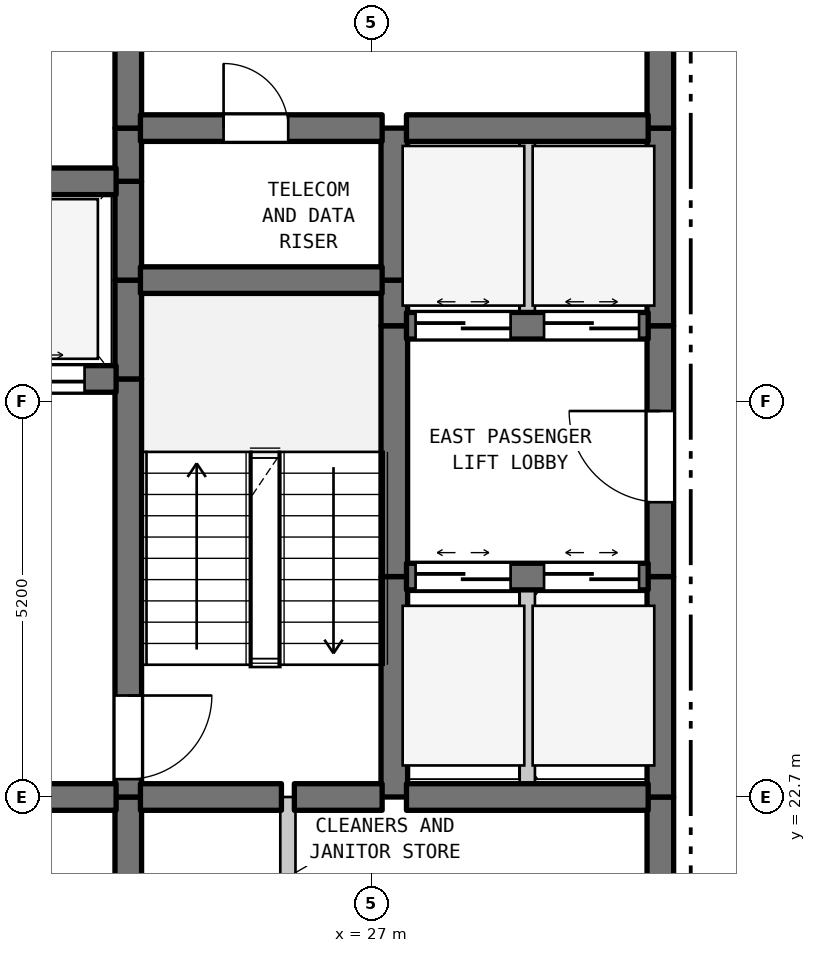
"""IFC4 building model, lengths in metres.
Left out: names, types, materials, properties, quantities, classifications, styles, units other than length and angle.
Written with IfcOpenShell. Run it as: python <this file> out.ifc"""

import sys

from ifc_helpers import new_model, si_unit, direction, frame, frame_2d, origin, place, context, subcontext, project, spatial, rectangle, extrude, element, fill, save


model = new_model("IFC4")
c1 = context("Model", 3, precision=1e-05, world=origin(), true_north=direction((0.0, 1.0)))
c2 = subcontext(c1, "Body", "Model", "MODEL_VIEW")
j1 = project(units=[si_unit("LENGTHUNIT", "METRE"), si_unit("PLANEANGLEUNIT", "RADIAN")], contexts=[c1])
p1 = place(None, origin())
s1 = spatial("IfcSite", under=j1, at=p1, CompositionType="ELEMENT")
p2 = place(p1, origin())
s2 = spatial("IfcBuilding", under=s1, at=p2, CompositionType="ELEMENT")
p3 = place(p2, frame((0.0, 0.0, 70.1)))
s3 = spatial("IfcBuildingStorey", under=s2, at=p3, CompositionType="ELEMENT", Elevation=70.1)
p4 = place(p3, frame((23.8, 19.5, 0.0), z_axis=(0.0, 0.0, 1.0), x_axis=(0.0, 1.0, 0.0)))
e1 = element("IfcWall", 1, at=p4, inside=s3, PredefinedType="SHEAR", context=c2, shape_type="SweptSolid", body=[
    extrude(rectangle(XDim=3.2, YDim=0.35, at=frame_2d((1.6, 0.0))), origin(), (0.0, 0.0, 1.0), 3.385),
])
p5 = place(p3, frame((23.8, 22.7, 0.0), z_axis=(0.0, 0.0, 1.0), x_axis=(0.0, 1.0, 0.0)))
e2 = element("IfcWall", 2, at=p5, inside=s3, PredefinedType="SHEAR", context=c2, shape_type="SweptSolid", body=[
    extrude(rectangle(XDim=5.5, YDim=0.35, at=frame_2d((2.75, 0.0))), origin(), (0.0, 0.0, 1.0), 3.385),
])
p6 = place(p5, frame((0.235, 0.0, 0.0)))
e3 = element("IfcOpeningElement", 3, at=p6, cuts=e2, PredefinedType="OPENING", context=c2, shape_type="SweptSolid", body=[
    extrude(rectangle(XDim=1.1, YDim=2.15, at=frame_2d((0.55, 1.075))), frame((0.0, 0.185, 0.0), z_axis=(0.0, -1.0, 0.0), x_axis=(1.0, 0.0, 0.0)), (0.0, 0.0, 1.0), 0.37),
])
for number, where, z_axis, x_axis in (
    (4, (23.8, 28.2, 0.0), (0.0, 0.0, 1.0), (0.0, 1.0, 0.0)),
    (5, (23.8, 29.5, 0.0), (0.0, 0.0, 1.0), (0.0, 1.0, 0.0)),
):
    element("IfcWall", number, at=place(p3, frame(where, z_axis=z_axis, x_axis=x_axis)), inside=s3, PredefinedType="SHEAR", context=c2, shape_type="SweptSolid", body=[
        extrude(rectangle(XDim=1.3, YDim=0.35, at=frame_2d((0.65, 0.0))), origin(), (0.0, 0.0, 1.0), 3.385),
    ])
p7 = place(p3, frame((23.8, 30.8, 0.0), z_axis=(0.0, 0.0, 1.0), x_axis=(0.0, 1.0, 0.0)))
e6 = element("IfcWall", 6, at=p7, inside=s3, PredefinedType="SHEAR", context=c2, shape_type="SweptSolid", body=[
    extrude(rectangle(XDim=0.7, YDim=0.35, at=frame_2d((0.35, 0.0))), origin(), (0.0, 0.0, 1.0), 3.385),
])
p8 = place(p3, frame((23.8, 31.5, 0.0), z_axis=(0.0, 0.0, 1.0), x_axis=(0.0, 1.0, 0.0)))
e7 = element("IfcWall", 7, at=p8, inside=s3, PredefinedType="SHEAR", context=c2, shape_type="SweptSolid", body=[
    extrude(rectangle(XDim=3.5, YDim=0.35, at=frame_2d((1.75, 0.0))), origin(), (0.0, 0.0, 1.0), 3.385),
])
p9 = place(p8, frame((1.127, 0.0, 0.0)))
e8 = element("IfcOpeningElement", 8, at=p9, cuts=e7, PredefinedType="OPENING", context=c2, shape_type="SweptSolid", body=[
    extrude(rectangle(XDim=1.1, YDim=2.15, at=frame_2d((0.55, 1.075))), frame((0.0, 0.185, 0.0), z_axis=(0.0, -1.0, 0.0), x_axis=(1.0, 0.0, 0.0)), (0.0, 0.0, 1.0), 0.37),
])
p10 = place(p3, frame((25.9, 19.5, 0.0), z_axis=(0.0, 0.0, 1.0), x_axis=(0.0, 1.0, 0.0)))
e9 = element("IfcWall", 9, at=p10, inside=s3, PredefinedType="STANDARD", context=c2, shape_type="SweptSolid", body=[
    extrude(rectangle(XDim=3.2, YDim=0.2, at=frame_2d((1.6, 0.0))), origin(), (0.0, 0.0, 1.0), 3.385),
])
p11 = place(p3, frame((27.3, 22.7, 0.0), z_axis=(0.0, 0.0, 1.0), x_axis=(0.0, 1.0, 0.0)))
e10 = element("IfcWall", 10, at=p11, inside=s3, PredefinedType="SHEAR", context=c2, shape_type="SweptSolid", body=[
    extrude(rectangle(XDim=2.9, YDim=0.35, at=frame_2d((1.45, 0.0))), origin(), (0.0, 0.0, 1.0), 3.385),
])
p12 = place(p3, frame((27.3, 25.6, 0.0), z_axis=(0.0, 0.0, 1.0), x_axis=(0.0, 1.0, 0.0)))
e11 = element("IfcWall", 11, at=p12, inside=s3, PredefinedType="SHEAR", context=c2, shape_type="SweptSolid", body=[
    extrude(rectangle(XDim=3.3, YDim=0.35, at=frame_2d((1.65, 0.0))), origin(), (0.0, 0.0, 1.0), 3.385),
])
p13 = place(p3, frame((27.3, 28.9, 0.0), z_axis=(0.0, 0.0, 1.0), x_axis=(0.0, 1.0, 0.0)))
e12 = element("IfcWall", 12, at=p13, inside=s3, PredefinedType="SHEAR", context=c2, shape_type="SweptSolid", body=[
    extrude(rectangle(XDim=0.6, YDim=0.35, at=frame_2d((0.3, 0.0))), origin(), (0.0, 0.0, 1.0), 3.385),
])
p14 = place(p3, frame((27.3, 29.5, 0.0), z_axis=(0.0, 0.0, 1.0), x_axis=(0.0, 1.0, 0.0)))
e13 = element("IfcWall", 13, at=p14, inside=s3, PredefinedType="SHEAR", context=c2, shape_type="SweptSolid", body=[
    extrude(rectangle(XDim=2.0, YDim=0.35, at=frame_2d((1.0, 0.0))), origin(), (0.0, 0.0, 1.0), 3.385),
])
p15 = place(p3, frame((29.05, 22.7, 0.0), z_axis=(0.0, 0.0, 1.0), x_axis=(0.0, 1.0, 0.0)))
e14 = element("IfcWall", 14, at=p15, inside=s3, PredefinedType="STANDARD", context=c2, shape_type="SweptSolid", body=[
    extrude(rectangle(XDim=2.9, YDim=0.2, at=frame_2d((1.45, 0.0))), origin(), (0.0, 0.0, 1.0), 3.385),
])
p16 = place(p3, frame((29.05, 28.9, 0.0), z_axis=(0.0, 0.0, 1.0), x_axis=(0.0, 1.0, 0.0)))
e15 = element("IfcWall", 15, at=p16, inside=s3, PredefinedType="STANDARD", context=c2, shape_type="SweptSolid", body=[
    extrude(rectangle(XDim=2.6, YDim=0.2, at=frame_2d((1.3, 0.0))), origin(), (0.0, 0.0, 1.0), 3.385),
])
p17 = place(p3, frame((30.8, 19.5, 0.0), z_axis=(0.0, 0.0, 1.0), x_axis=(0.0, 1.0, 0.0)))
e16 = element("IfcWall", 16, at=p17, inside=s3, PredefinedType="SHEAR", context=c2, shape_type="SweptSolid", body=[
    extrude(rectangle(XDim=3.2, YDim=0.35, at=frame_2d((1.6, 0.0))), origin(), (0.0, 0.0, 1.0), 3.385),
])
p18 = place(p3, frame((30.8, 22.7, 0.0), z_axis=(0.0, 0.0, 1.0), x_axis=(0.0, 1.0, 0.0)))
e17 = element("IfcWall", 17, at=p18, inside=s3, PredefinedType="SHEAR", context=c2, shape_type="SweptSolid", body=[
    extrude(rectangle(XDim=2.9, YDim=0.35, at=frame_2d((1.45, 0.0))), origin(), (0.0, 0.0, 1.0), 3.385),
])
p19 = place(p3, frame((30.8, 25.6, 0.0), z_axis=(0.0, 0.0, 1.0), x_axis=(0.0, 1.0, 0.0)))
e18 = element("IfcWall", 18, at=p19, inside=s3, PredefinedType="SHEAR", context=c2, shape_type="SweptSolid", body=[
    extrude(rectangle(XDim=3.3, YDim=0.35, at=frame_2d((1.65, 0.0))), origin(), (0.0, 0.0, 1.0), 3.385),
])
p20 = place(p19, frame((0.978, 0.0, 0.0)))
e19 = element("IfcOpeningElement", 19, at=p20, cuts=e18, PredefinedType="OPENING", context=c2, shape_type="SweptSolid", body=[
    extrude(rectangle(XDim=1.2, YDim=2.2, at=frame_2d((0.6, 1.1))), frame((0.0, 0.185, 0.0), z_axis=(0.0, -1.0, 0.0), x_axis=(1.0, 0.0, 0.0)), (0.0, 0.0, 1.0), 0.37),
])
p21 = place(p3, frame((30.8, 28.9, 0.0), z_axis=(0.0, 0.0, 1.0), x_axis=(0.0, 1.0, 0.0)))
e20 = element("IfcWall", 20, at=p21, inside=s3, PredefinedType="SHEAR", context=c2, shape_type="SweptSolid", body=[
    extrude(rectangle(XDim=2.6, YDim=0.35, at=frame_2d((1.3, 0.0))), origin(), (0.0, 0.0, 1.0), 3.385),
])
p22 = place(p3, frame((30.8, 31.5, 0.0), z_axis=(0.0, 0.0, 1.0), x_axis=(0.0, 1.0, 0.0)))
e21 = element("IfcWall", 21, at=p22, inside=s3, PredefinedType="SHEAR", context=c2, shape_type="SweptSolid", body=[
    extrude(rectangle(XDim=3.5, YDim=0.35, at=frame_2d((1.75, 0.0))), origin(), (0.0, 0.0, 1.0), 3.385),
])
p23 = place(p22, frame((1.15, 0.0, 0.0)))
e22 = element("IfcOpeningElement", 22, at=p23, cuts=e21, PredefinedType="OPENING", context=c2, shape_type="SweptSolid", body=[
    extrude(rectangle(XDim=1.2, YDim=2.2, at=frame_2d((0.6, 1.1))), frame((0.0, 0.185, 0.0), z_axis=(0.0, -1.0, 0.0), x_axis=(1.0, 0.0, 0.0)), (0.0, 0.0, 1.0), 0.37),
])
p24 = place(p3, frame((19.16, 22.7, 0.0), z_axis=(0.0, 0.0, 1.0), x_axis=(1.0, 0.0, 0.0)))
e23 = element("IfcWall", 23, at=p24, inside=s3, PredefinedType="SHEAR", context=c2, shape_type="SweptSolid", body=[
    extrude(rectangle(XDim=4.48, YDim=0.35, at=frame_2d((2.24, 0.0))), origin(), (0.0, 0.0, 1.0), 3.385),
])
p25 = place(p24, frame((1.64, 0.0, 0.0)))
e24 = element("IfcOpeningElement", 24, at=p25, cuts=e23, PredefinedType="OPENING", context=c2, shape_type="SweptSolid", body=[
    extrude(rectangle(XDim=1.2, YDim=2.2, at=frame_2d((0.6, 1.1))), frame((0.0, 0.185, 0.0), z_axis=(0.0, -1.0, 0.0), x_axis=(1.0, 0.0, 0.0)), (0.0, 0.0, 1.0), 0.37),
])
p26 = place(p3, frame((23.96, 22.7, 0.0), z_axis=(0.0, 0.0, 1.0), x_axis=(1.0, 0.0, 0.0)))
e25 = element("IfcWall", 25, at=p26, inside=s3, PredefinedType="SHEAR", context=c2, shape_type="SweptSolid", body=[
    extrude(rectangle(XDim=1.855, YDim=0.35, at=frame_2d((0.927, 0.0))), origin(), (0.0, 0.0, 1.0), 3.385),
])
p27 = place(p3, frame((25.985, 22.7, 0.0), z_axis=(0.0, 0.0, 1.0), x_axis=(1.0, 0.0, 0.0)))
e26 = element("IfcWall", 26, at=p27, inside=s3, PredefinedType="SHEAR", context=c2, shape_type="SweptSolid", body=[
    extrude(rectangle(XDim=1.155, YDim=0.35, at=frame_2d((0.577, 0.0))), origin(), (0.0, 0.0, 1.0), 3.385),
])
p28 = place(p3, frame((27.46, 22.7, 0.0), z_axis=(0.0, 0.0, 1.0), x_axis=(1.0, 0.0, 0.0)))
e27 = element("IfcWall", 27, at=p28, inside=s3, PredefinedType="SHEAR", context=c2, shape_type="SweptSolid", body=[
    extrude(rectangle(XDim=3.18, YDim=0.35, at=frame_2d((1.59, 0.0))), origin(), (0.0, 0.0, 1.0), 3.385),
])
p29 = place(p3, frame((27.46, 25.6, 0.0), z_axis=(0.0, 0.0, 1.0), x_axis=(1.0, 0.0, 0.0)))
e28 = element("IfcWall", 28, at=p29, inside=s3, PredefinedType="SHEAR", context=c2, shape_type="SweptSolid", body=[
    extrude(rectangle(XDim=3.18, YDim=0.35, at=frame_2d((1.59, 0.0))), origin(), (0.0, 0.0, 1.0), 3.385),
])
p30 = place(p29, frame((0.12, 0.0, 0.0)))
e29 = element("IfcOpeningElement", 29, at=p30, cuts=e28, PredefinedType="OPENING", context=c2, shape_type="SweptSolid", body=[
    extrude(rectangle(XDim=1.25, YDim=2.2, at=frame_2d((0.625, 1.1))), frame((0.0, 0.185, 0.0), z_axis=(0.0, -1.0, 0.0), x_axis=(1.0, 0.0, 0.0)), (0.0, 0.0, 1.0), 0.37),
])
p31 = place(p29, frame((1.81, 0.0, 0.0)))
e30 = element("IfcOpeningElement", 30, at=p31, cuts=e28, PredefinedType="OPENING", context=c2, shape_type="SweptSolid", body=[
    extrude(rectangle(XDim=1.25, YDim=2.2, at=frame_2d((0.625, 1.1))), frame((0.0, 0.185, 0.0), z_axis=(0.0, -1.0, 0.0), x_axis=(1.0, 0.0, 0.0)), (0.0, 0.0, 1.0), 0.37),
])
p32 = place(p3, frame((19.16, 28.2, 0.0), z_axis=(0.0, 0.0, 1.0), x_axis=(1.0, 0.0, 0.0)))
e31 = element("IfcWall", 31, at=p32, inside=s3, PredefinedType="SHEAR", context=c2, shape_type="SweptSolid", body=[
    extrude(rectangle(XDim=4.48, YDim=0.35, at=frame_2d((2.24, 0.0))), origin(), (0.0, 0.0, 1.0), 3.385),
])
p33 = place(p32, frame((0.415, 0.0, 0.0)))
e32 = element("IfcOpeningElement", 32, at=p33, cuts=e31, PredefinedType="OPENING", context=c2, shape_type="SweptSolid", body=[
    extrude(rectangle(XDim=1.25, YDim=2.2, at=frame_2d((0.625, 1.1))), frame((0.0, 0.185, 0.0), z_axis=(0.0, -1.0, 0.0), x_axis=(1.0, 0.0, 0.0)), (0.0, 0.0, 1.0), 0.37),
])
p34 = place(p32, frame((2.815, 0.0, 0.0)))
e33 = element("IfcOpeningElement", 33, at=p34, cuts=e31, PredefinedType="OPENING", context=c2, shape_type="SweptSolid", body=[
    extrude(rectangle(XDim=1.25, YDim=2.2, at=frame_2d((0.625, 1.1))), frame((0.0, 0.185, 0.0), z_axis=(0.0, -1.0, 0.0), x_axis=(1.0, 0.0, 0.0)), (0.0, 0.0, 1.0), 0.37),
])
p35 = place(p3, frame((27.46, 28.9, 0.0), z_axis=(0.0, 0.0, 1.0), x_axis=(1.0, 0.0, 0.0)))
e34 = element("IfcWall", 34, at=p35, inside=s3, PredefinedType="SHEAR", context=c2, shape_type="SweptSolid", body=[
    extrude(rectangle(XDim=3.18, YDim=0.35, at=frame_2d((1.59, 0.0))), origin(), (0.0, 0.0, 1.0), 3.385),
])
p36 = place(p35, frame((0.12, 0.0, 0.0)))
e35 = element("IfcOpeningElement", 35, at=p36, cuts=e34, PredefinedType="OPENING", context=c2, shape_type="SweptSolid", body=[
    extrude(rectangle(XDim=1.25, YDim=2.2, at=frame_2d((0.625, 1.1))), frame((0.0, 0.185, 0.0), z_axis=(0.0, -1.0, 0.0), x_axis=(1.0, 0.0, 0.0)), (0.0, 0.0, 1.0), 0.37),
])
p37 = place(p35, frame((1.81, 0.0, 0.0)))
e36 = element("IfcOpeningElement", 36, at=p37, cuts=e34, PredefinedType="OPENING", context=c2, shape_type="SweptSolid", body=[
    extrude(rectangle(XDim=1.25, YDim=2.2, at=frame_2d((0.625, 1.1))), frame((0.0, 0.185, 0.0), z_axis=(0.0, -1.0, 0.0), x_axis=(1.0, 0.0, 0.0)), (0.0, 0.0, 1.0), 0.37),
])
p38 = place(p3, frame((23.96, 29.5, 0.0), z_axis=(0.0, 0.0, 1.0), x_axis=(1.0, 0.0, 0.0)))
e37 = element("IfcWall", 37, at=p38, inside=s3, PredefinedType="SHEAR", context=c2, shape_type="SweptSolid", body=[
    extrude(rectangle(XDim=3.18, YDim=0.35, at=frame_2d((1.59, 0.0))), origin(), (0.0, 0.0, 1.0), 3.385),
])
p39 = place(p3, frame((19.16, 30.8, 0.0), z_axis=(0.0, 0.0, 1.0), x_axis=(1.0, 0.0, 0.0)))
e38 = element("IfcWall", 38, at=p39, inside=s3, PredefinedType="SHEAR", context=c2, shape_type="SweptSolid", body=[
    extrude(rectangle(XDim=4.48, YDim=0.35, at=frame_2d((2.24, 0.0))), origin(), (0.0, 0.0, 1.0), 3.385),
])
p40 = place(p3, frame((23.96, 31.5, 0.0), z_axis=(0.0, 0.0, 1.0), x_axis=(1.0, 0.0, 0.0)))
e39 = element("IfcWall", 39, at=p40, inside=s3, PredefinedType="SHEAR", context=c2, shape_type="SweptSolid", body=[
    extrude(rectangle(XDim=3.18, YDim=0.35, at=frame_2d((1.59, 0.0))), origin(), (0.0, 0.0, 1.0), 3.385),
])
p41 = place(p40, frame((1.094, 0.0, 0.0)))
e40 = element("IfcOpeningElement", 40, at=p41, cuts=e39, PredefinedType="OPENING", context=c2, shape_type="SweptSolid", body=[
    extrude(rectangle(XDim=0.85, YDim=2.1, at=frame_2d((0.425, 1.05))), frame((0.0, 0.185, 0.0), z_axis=(0.0, -1.0, 0.0), x_axis=(1.0, 0.0, 0.0)), (0.0, 0.0, 1.0), 0.37),
])
p42 = place(p3, frame((27.46, 31.5, 0.0), z_axis=(0.0, 0.0, 1.0), x_axis=(1.0, 0.0, 0.0)))
e41 = element("IfcWall", 41, at=p42, inside=s3, PredefinedType="SHEAR", context=c2, shape_type="SweptSolid", body=[
    extrude(rectangle(XDim=3.18, YDim=0.35, at=frame_2d((1.59, 0.0))), origin(), (0.0, 0.0, 1.0), 3.385),
])
p43 = place(p6, frame((1.1, 0.0, 0.0), z_axis=(0.0, 0.0, 1.0), x_axis=(-1.0, 0.0, 0.0)))
e42 = element("IfcDoor", 42, at=p43, inside=s3, OperationType="SINGLE_SWING_RIGHT", PredefinedType="DOOR", context=c2, shape_type="SweptSolid", body=[
    extrude(rectangle(XDim=1.1, YDim=2.15, at=frame_2d((0.55, 1.075))), frame((0.0, 0.025, 0.0), z_axis=(0.0, -1.0, 0.0), x_axis=(1.0, 0.0, 0.0)), (0.0, 0.0, 1.0), 0.05),
])
fill(e3, e42)
p44 = place(p20, origin())
e43 = element("IfcDoor", 43, at=p44, inside=s3, OperationType="SINGLE_SWING_RIGHT", PredefinedType="DOOR", context=c2, shape_type="SweptSolid", body=[
    extrude(rectangle(XDim=1.2, YDim=2.2, at=frame_2d((0.6, 1.1))), frame((0.0, 0.025, 0.0), z_axis=(0.0, -1.0, 0.0), x_axis=(1.0, 0.0, 0.0)), (0.0, 0.0, 1.0), 0.05),
])
fill(e19, e43)
p45 = place(p30, origin())
e44 = element("IfcDoor", 44, at=p45, inside=s3, OperationType="DOUBLE_DOOR_SLIDING", PredefinedType="DOOR", context=c2, shape_type="SweptSolid", body=[
    extrude(rectangle(XDim=1.25, YDim=2.2, at=frame_2d((0.625, 1.1))), frame((0.0, 0.025, 0.0), z_axis=(0.0, -1.0, 0.0), x_axis=(1.0, 0.0, 0.0)), (0.0, 0.0, 1.0), 0.05),
])
fill(e29, e44)
p46 = place(p31, origin())
e45 = element("IfcDoor", 45, at=p46, inside=s3, OperationType="DOUBLE_DOOR_SLIDING", PredefinedType="DOOR", context=c2, shape_type="SweptSolid", body=[
    extrude(rectangle(XDim=1.25, YDim=2.2, at=frame_2d((0.625, 1.1))), frame((0.0, 0.025, 0.0), z_axis=(0.0, -1.0, 0.0), x_axis=(1.0, 0.0, 0.0)), (0.0, 0.0, 1.0), 0.05),
])
fill(e30, e45)
p47 = place(p34, origin())
e46 = element("IfcDoor", 46, at=p47, inside=s3, OperationType="DOUBLE_DOOR_SLIDING", PredefinedType="DOOR", context=c2, shape_type="SweptSolid", body=[
    extrude(rectangle(XDim=1.25, YDim=2.2, at=frame_2d((0.625, 1.1))), frame((0.0, 0.025, 0.0), z_axis=(0.0, -1.0, 0.0), x_axis=(1.0, 0.0, 0.0)), (0.0, 0.0, 1.0), 0.05),
])
fill(e33, e46)
p48 = place(p36, origin())
e47 = element("IfcDoor", 47, at=p48, inside=s3, OperationType="DOUBLE_DOOR_SLIDING", PredefinedType="DOOR", context=c2, shape_type="SweptSolid", body=[
    extrude(rectangle(XDim=1.25, YDim=2.2, at=frame_2d((0.625, 1.1))), frame((0.0, 0.025, 0.0), z_axis=(0.0, -1.0, 0.0), x_axis=(1.0, 0.0, 0.0)), (0.0, 0.0, 1.0), 0.05),
])
fill(e35, e47)
p49 = place(p37, origin())
e48 = element("IfcDoor", 48, at=p49, inside=s3, OperationType="DOUBLE_DOOR_SLIDING", PredefinedType="DOOR", context=c2, shape_type="SweptSolid", body=[
    extrude(rectangle(XDim=1.25, YDim=2.2, at=frame_2d((0.625, 1.1))), frame((0.0, 0.025, 0.0), z_axis=(0.0, -1.0, 0.0), x_axis=(1.0, 0.0, 0.0)), (0.0, 0.0, 1.0), 0.05),
])
fill(e36, e48)
p50 = place(p41, origin())
e49 = element("IfcDoor", 49, at=p50, inside=s3, OperationType="SINGLE_SWING_LEFT", PredefinedType="DOOR", context=c2, shape_type="SweptSolid", body=[
    extrude(rectangle(XDim=0.85, YDim=2.1, at=frame_2d((0.425, 1.05))), frame((0.0, 0.025, 0.0), z_axis=(0.0, -1.0, 0.0), x_axis=(1.0, 0.0, 0.0)), (0.0, 0.0, 1.0), 0.05),
])
fill(e40, e49)
save(model, sys.argv[1])
